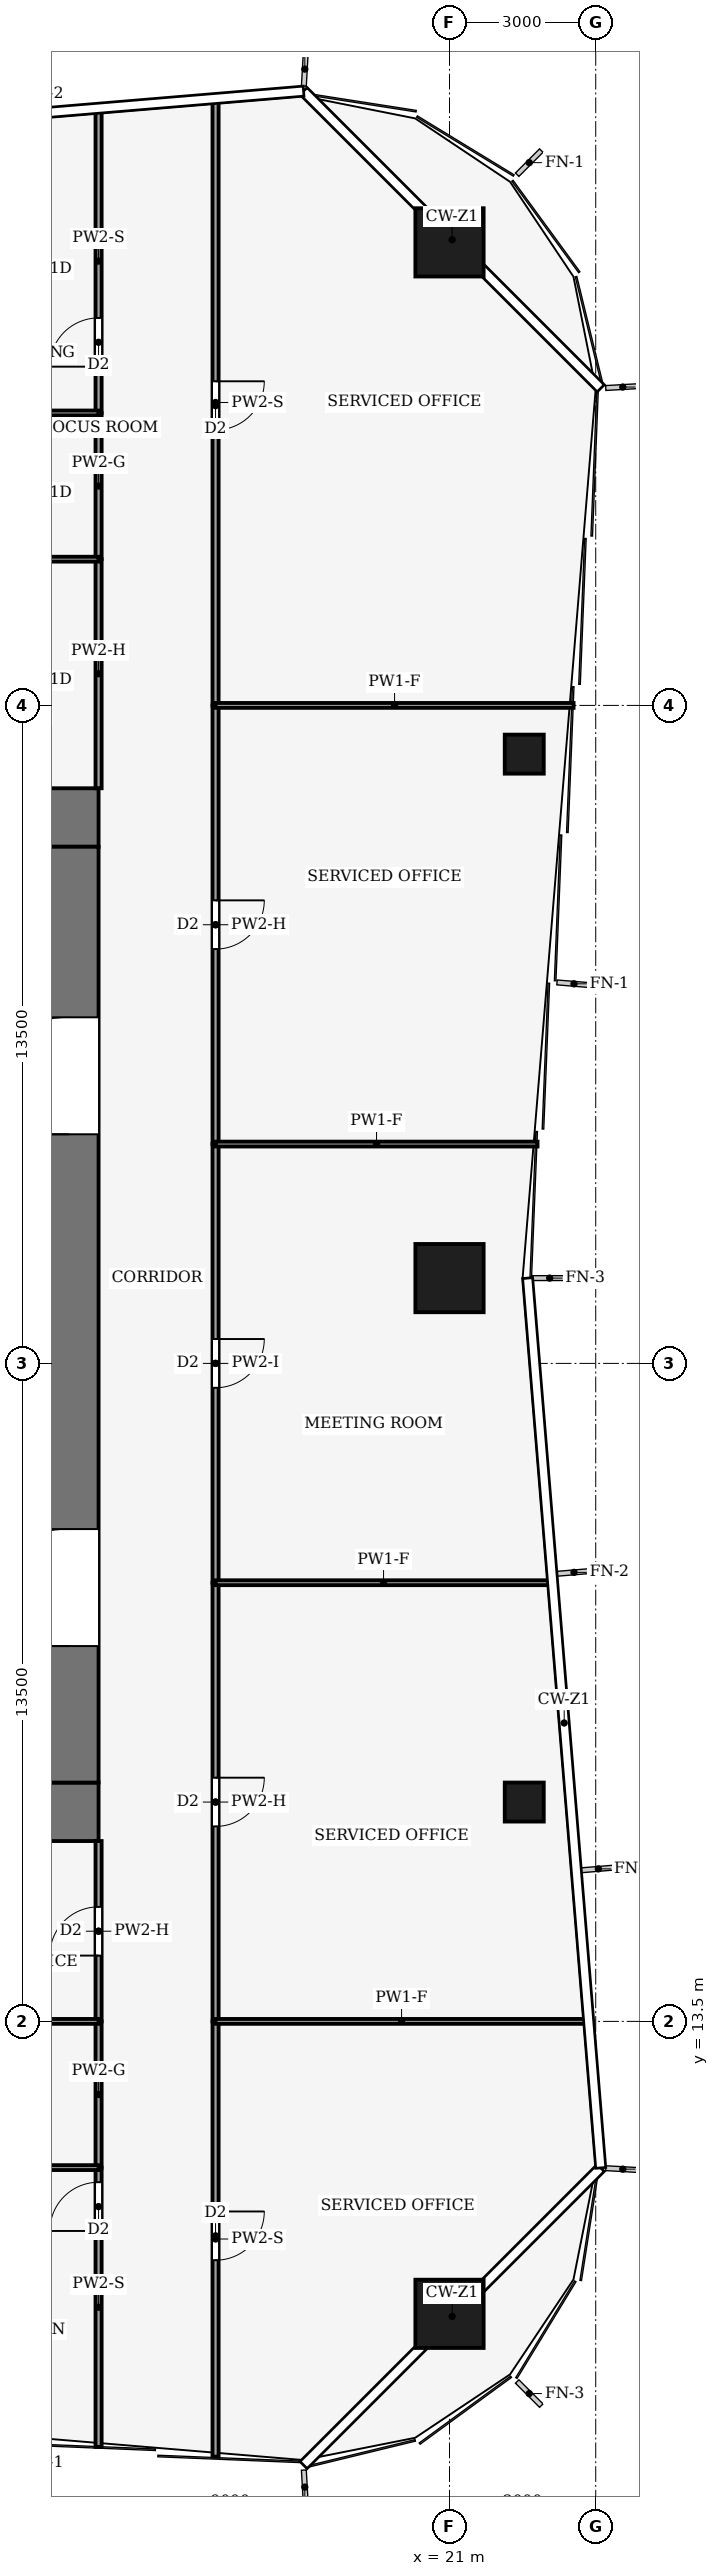
"""IFC4 building model, lengths in metres.
Left out: names, types, materials, properties, quantities, classifications, styles, units other than length and angle.
Written with IfcOpenShell. Run it as: python <this file> out.ifc"""

import sys

from ifc_helpers import new_model, si_unit, direction, frame, frame_2d, origin, origin_2d, place, context, subcontext, project, spatial, rectangle, hollow_rectangle, extrude, element, fill, save


model = new_model("IFC4")
c1 = context("Model", 3, precision=1e-05, world=origin(), true_north=direction((0.0, 1.0)))
c2 = subcontext(c1, "Body", "Model", "MODEL_VIEW")
j1 = project(units=[si_unit("LENGTHUNIT", "METRE"), si_unit("PLANEANGLEUNIT", "RADIAN")], contexts=[c1])
p1 = place(None, origin())
s1 = spatial("IfcSite", under=j1, at=p1, CompositionType="ELEMENT")
p2 = place(p1, origin())
s2 = spatial("IfcBuilding", under=s1, at=p2, CompositionType="ELEMENT")
p3 = place(p2, frame((0.0, 0.0, 94.0)))
s3 = spatial("IfcBuildingStorey", under=s2, at=p3, CompositionType="ELEMENT", Elevation=94.0)
for number, where, z_axis, x_axis in (
    (1, (-13.8, 17.8, -0.13), (0.0, 0.0, 1.0), (1.0, 0.0, 0.0)),
    (2, (-13.8, 38.2, -0.13), (0.0, 0.0, 1.0), (1.0, 0.0, 0.0)),
):
    element("IfcWall", number, at=place(p3, frame(where, z_axis=z_axis, x_axis=x_axis)), inside=s3, PredefinedType="SHEAR", context=c2, shape_type="SweptSolid", body=[
        extrude(rectangle(XDim=27.6, YDim=1.2, at=frame_2d((13.8, 0.0))), origin(), (0.0, 0.0, 1.0), 4.0),
    ])
p4 = place(p3, frame((13.2, 18.4, -0.13), z_axis=(0.0, 0.0, 1.0), x_axis=(0.0, 1.0, 0.0)))
e3 = element("IfcWall", 3, at=p4, inside=s3, PredefinedType="SHEAR", context=c2, shape_type="SweptSolid", body=[
    extrude(rectangle(XDim=19.2, YDim=1.2, at=frame_2d((9.6, 0.0))), origin(), (0.0, 0.0, 1.0), 4.0),
])
p5 = place(p4, frame((2.8, 0.0, 0.13)))
e4 = element("IfcOpeningElement", 4, at=p5, cuts=e3, PredefinedType="OPENING", context=c2, shape_type="SweptSolid", body=[
    extrude(rectangle(XDim=2.4, YDim=2.4, at=frame_2d((1.2, 1.2))), frame((0.0, 0.61, 0.0), z_axis=(0.0, -1.0, 0.0), x_axis=(1.0, 0.0, 0.0)), (0.0, 0.0, 1.0), 1.22),
])
p6 = place(p4, frame((13.3, 0.0, 0.13)))
e5 = element("IfcOpeningElement", 5, at=p6, cuts=e3, PredefinedType="OPENING", context=c2, shape_type="SweptSolid", body=[
    extrude(rectangle(XDim=2.4, YDim=2.4, at=frame_2d((1.2, 1.2))), frame((0.0, 0.61, 0.0), z_axis=(0.0, -1.0, 0.0), x_axis=(1.0, 0.0, 0.0)), (0.0, 0.0, 1.0), 1.22),
])
for number, where, z_axis, x_axis in (
    (6, (21.0, 50.0, 0.0), (0.0, 0.0, 1.0), (1.0, 0.0, 0.0)),
    (7, (21.0, 28.75, 0.0), (0.0, 0.0, 1.0), (1.0, 0.0, 0.0)),
    (8, (21.0, 7.5, 0.0), (0.0, 0.0, 1.0), (1.0, 0.0, 0.0)),
):
    element("IfcColumn", number, at=place(p3, frame(where, z_axis=z_axis, x_axis=x_axis)), inside=s3, PredefinedType="COLUMN", context=c2, shape_type="SweptSolid", body=[
        extrude(hollow_rectangle(XDim=1.4, YDim=1.4, WallThickness=0.08, at=origin_2d()), origin(), (0.0, 0.0, 1.0), 4.0),
    ])
for number, where, z_axis, x_axis in (
    (9, (22.534, 18.0, 0.0), (0.0, 0.0, 1.0), (1.0, 0.0, 0.0)),
    (10, (22.534, 39.5, 0.0), (0.0, 0.0, 1.0), (1.0, 0.0, 0.0)),
):
    element("IfcColumn", number, at=place(p3, frame(where, z_axis=z_axis, x_axis=x_axis)), inside=s3, PredefinedType="COLUMN", context=c2, shape_type="SweptSolid", body=[
        extrude(hollow_rectangle(XDim=0.8, YDim=0.8, WallThickness=0.04, at=origin_2d()), origin(), (0.0, 0.0, 1.0), 4.0),
    ])
p7 = place(p3, frame((16.2, 13.5, 0.0), z_axis=(0.0, 0.0, 1.0), x_axis=(0.0, -1.0, 0.0)))
e11 = element("IfcWall", 11, at=p7, inside=s3, PredefinedType="PARTITIONING", context=c2, shape_type="SweptSolid", body=[
    extrude(rectangle(XDim=8.93, YDim=0.125, at=frame_2d((4.465, 0.0))), origin(), (0.0, 0.0, 1.0), 3.04),
])
p8 = place(p7, frame((3.9, 0.0, 0.0)))
e12 = element("IfcOpeningElement", 12, at=p8, cuts=e11, PredefinedType="OPENING", context=c2, shape_type="SweptSolid", body=[
    extrude(rectangle(XDim=1.0, YDim=2.1, at=frame_2d((0.5, 1.05))), frame((0.0, 0.073, 0.0), z_axis=(0.0, -1.0, 0.0), x_axis=(1.0, 0.0, 0.0)), (0.0, 0.0, 1.0), 0.145),
])
p9 = place(p3, frame((16.2, 22.5, 0.0), z_axis=(0.0, 0.0, 1.0), x_axis=(0.0, -1.0, 0.0)))
e13 = element("IfcWall", 13, at=p9, inside=s3, PredefinedType="PARTITIONING", context=c2, shape_type="SweptSolid", body=[
    extrude(rectangle(XDim=9.0, YDim=0.125, at=frame_2d((4.5, 0.0))), origin(), (0.0, 0.0, 1.0), 3.14),
])
p10 = place(p9, frame((4.0, 0.0, 0.0)))
e14 = element("IfcOpeningElement", 14, at=p10, cuts=e13, PredefinedType="OPENING", context=c2, shape_type="SweptSolid", body=[
    extrude(rectangle(XDim=1.0, YDim=2.1, at=frame_2d((0.5, 1.05))), frame((0.0, 0.073, 0.0), z_axis=(0.0, -1.0, 0.0), x_axis=(1.0, 0.0, 0.0)), (0.0, 0.0, 1.0), 0.145),
])
p11 = place(p3, frame((16.2, 31.5, 0.0), z_axis=(0.0, 0.0, 1.0), x_axis=(0.0, -1.0, 0.0)))
e15 = element("IfcWall", 15, at=p11, inside=s3, PredefinedType="PARTITIONING", context=c2, shape_type="SweptSolid", body=[
    extrude(rectangle(XDim=9.0, YDim=0.125, at=frame_2d((4.5, 0.0))), origin(), (0.0, 0.0, 1.0), 3.48),
])
p12 = place(p11, frame((4.0, 0.0, 0.0)))
e16 = element("IfcOpeningElement", 16, at=p12, cuts=e15, PredefinedType="OPENING", context=c2, shape_type="SweptSolid", body=[
    extrude(rectangle(XDim=1.0, YDim=2.1, at=frame_2d((0.5, 1.05))), frame((0.0, 0.073, 0.0), z_axis=(0.0, -1.0, 0.0), x_axis=(1.0, 0.0, 0.0)), (0.0, 0.0, 1.0), 0.145),
])
p13 = place(p3, frame((16.2, 40.5, 0.0), z_axis=(0.0, 0.0, 1.0), x_axis=(0.0, -1.0, 0.0)))
e17 = element("IfcWall", 17, at=p13, inside=s3, PredefinedType="PARTITIONING", context=c2, shape_type="SweptSolid", body=[
    extrude(rectangle(XDim=9.0, YDim=0.125, at=frame_2d((4.5, 0.0))), origin(), (0.0, 0.0, 1.0), 3.14),
])
p14 = place(p13, frame((4.0, 0.0, 0.0)))
e18 = element("IfcOpeningElement", 18, at=p14, cuts=e17, PredefinedType="OPENING", context=c2, shape_type="SweptSolid", body=[
    extrude(rectangle(XDim=1.0, YDim=2.1, at=frame_2d((0.5, 1.05))), frame((0.0, 0.073, 0.0), z_axis=(0.0, -1.0, 0.0), x_axis=(1.0, 0.0, 0.0)), (0.0, 0.0, 1.0), 0.145),
])
p15 = place(p3, frame((16.2, 52.93, 0.0), z_axis=(0.0, 0.0, 1.0), x_axis=(0.0, -1.0, 0.0)))
e19 = element("IfcWall", 19, at=p15, inside=s3, PredefinedType="PARTITIONING", context=c2, shape_type="SweptSolid", body=[
    extrude(rectangle(XDim=12.43, YDim=0.125, at=frame_2d((6.215, 0.0))), origin(), (0.0, 0.0, 1.0), 3.04),
])
p16 = place(p15, frame((5.78, 0.0, 0.0)))
e20 = element("IfcOpeningElement", 20, at=p16, cuts=e19, PredefinedType="OPENING", context=c2, shape_type="SweptSolid", body=[
    extrude(rectangle(XDim=1.0, YDim=2.1, at=frame_2d((0.5, 1.05))), frame((0.0, 0.073, 0.0), z_axis=(0.0, -1.0, 0.0), x_axis=(1.0, 0.0, 0.0)), (0.0, 0.0, 1.0), 0.145),
])
p17 = place(p3, frame((13.8, 4.77, 0.0), z_axis=(0.0, 0.0, 1.0), x_axis=(0.0, 1.0, 0.0)))
e21 = element("IfcWall", 21, at=p17, inside=s3, PredefinedType="PARTITIONING", context=c2, shape_type="SweptSolid", body=[
    extrude(rectangle(XDim=5.73, YDim=0.125, at=frame_2d((2.865, 0.0))), origin(), (0.0, 0.0, 1.0), 3.04),
])
p18 = place(p17, frame((4.43, 0.0, 0.0)))
e22 = element("IfcOpeningElement", 22, at=p18, cuts=e21, PredefinedType="OPENING", context=c2, shape_type="SweptSolid", body=[
    extrude(rectangle(XDim=1.0, YDim=2.1, at=frame_2d((0.5, 1.05))), frame((0.0, 0.073, 0.0), z_axis=(0.0, -1.0, 0.0), x_axis=(1.0, 0.0, 0.0)), (0.0, 0.0, 1.0), 0.145),
])
p19 = place(p3, frame((13.8, 13.5, 0.0), z_axis=(0.0, 0.0, 1.0), x_axis=(0.0, -1.0, 0.0)))
e23 = element("IfcWall", 23, at=p19, inside=s3, PredefinedType="PARTITIONING", context=c2, shape_type="SweptSolid", body=[
    extrude(rectangle(XDim=3.0, YDim=0.125, at=frame_2d((1.5, 0.0))), origin(), (0.0, 0.0, 1.0), 3.87),
])
p20 = place(p3, frame((13.8, 13.5, 0.0), z_axis=(0.0, 0.0, 1.0), x_axis=(0.0, 1.0, 0.0)))
e24 = element("IfcWall", 24, at=p20, inside=s3, PredefinedType="PARTITIONING", context=c2, shape_type="SweptSolid", body=[
    extrude(rectangle(XDim=3.7, YDim=0.125, at=frame_2d((1.85, 0.0))), origin(), (0.0, 0.0, 1.0), 3.14),
])
p21 = place(p20, frame((1.35, 0.0, 0.0)))
e25 = element("IfcOpeningElement", 25, at=p21, cuts=e24, PredefinedType="OPENING", context=c2, shape_type="SweptSolid", body=[
    extrude(rectangle(XDim=1.0, YDim=2.1, at=frame_2d((0.5, 1.05))), frame((0.0, 0.073, 0.0), z_axis=(0.0, -1.0, 0.0), x_axis=(1.0, 0.0, 0.0)), (0.0, 0.0, 1.0), 0.145),
])
p22 = place(p3, frame((13.8, 43.5, 0.0), z_axis=(0.0, 0.0, 1.0), x_axis=(0.0, -1.0, 0.0)))
e26 = element("IfcWall", 26, at=p22, inside=s3, PredefinedType="PARTITIONING", context=c2, shape_type="SweptSolid", body=[
    extrude(rectangle(XDim=4.7, YDim=0.125, at=frame_2d((2.35, 0.0))), origin(), (0.0, 0.0, 1.0), 3.14),
])
p23 = place(p3, frame((13.8, 46.5, 0.0), z_axis=(0.0, 0.0, 1.0), x_axis=(0.0, -1.0, 0.0)))
e27 = element("IfcWall", 27, at=p23, inside=s3, PredefinedType="PARTITIONING", context=c2, shape_type="SweptSolid", body=[
    extrude(rectangle(XDim=3.0, YDim=0.125, at=frame_2d((1.5, 0.0))), origin(), (0.0, 0.0, 1.0), 3.87),
])
p24 = place(p3, frame((13.8, 46.5, 0.0), z_axis=(0.0, 0.0, 1.0), x_axis=(0.0, 1.0, 0.0)))
e28 = element("IfcWall", 28, at=p24, inside=s3, PredefinedType="PARTITIONING", context=c2, shape_type="SweptSolid", body=[
    extrude(rectangle(XDim=6.23, YDim=0.125, at=frame_2d((3.115, 0.0))), origin(), (0.0, 0.0, 1.0), 3.04),
])
p25 = place(p24, frame((0.95, 0.0, 0.0)))
e29 = element("IfcOpeningElement", 29, at=p25, cuts=e28, PredefinedType="OPENING", context=c2, shape_type="SweptSolid", body=[
    extrude(rectangle(XDim=1.0, YDim=2.1, at=frame_2d((0.5, 1.05))), frame((0.0, 0.073, 0.0), z_axis=(0.0, -1.0, 0.0), x_axis=(1.0, 0.0, 0.0)), (0.0, 0.0, 1.0), 0.145),
])
p26 = place(p3, frame((23.833, 13.5, 0.0), z_axis=(0.0, 0.0, 1.0), x_axis=(-1.0, 0.0, 0.0)))
e30 = element("IfcWall", 30, at=p26, inside=s3, PredefinedType="PARTITIONING", context=c2, shape_type="SweptSolid", body=[
    extrude(rectangle(XDim=7.634, YDim=0.1, at=frame_2d((3.817, 0.0))), origin(), (0.0, 0.0, 1.0), 3.04),
])
p27 = place(p3, frame((23.094, 22.5, 0.0), z_axis=(0.0, 0.0, 1.0), x_axis=(-1.0, 0.0, 0.0)))
e31 = element("IfcWall", 31, at=p27, inside=s3, PredefinedType="PARTITIONING", context=c2, shape_type="SweptSolid", body=[
    extrude(rectangle(XDim=6.894, YDim=0.1, at=frame_2d((3.447, 0.0))), origin(), (0.0, 0.0, 1.0), 3.04),
])
p28 = place(p3, frame((22.806, 31.5, 0.0), z_axis=(0.0, 0.0, 1.0), x_axis=(-1.0, 0.0, 0.0)))
e32 = element("IfcWall", 32, at=p28, inside=s3, PredefinedType="PARTITIONING", context=c2, shape_type="SweptSolid", body=[
    extrude(rectangle(XDim=6.606, YDim=0.1, at=frame_2d((3.303, 0.0))), origin(), (0.0, 0.0, 1.0), 3.04),
])
p29 = place(p3, frame((23.546, 40.5, 0.0), z_axis=(0.0, 0.0, 1.0), x_axis=(-1.0, 0.0, 0.0)))
e33 = element("IfcWall", 33, at=p29, inside=s3, PredefinedType="PARTITIONING", context=c2, shape_type="SweptSolid", body=[
    extrude(rectangle(XDim=7.346, YDim=0.1, at=frame_2d((3.673, 0.0))), origin(), (0.0, 0.0, 1.0), 3.04),
])
p30 = place(p3, frame((7.5, 10.5, 0.0), z_axis=(0.0, 0.0, 1.0), x_axis=(1.0, 0.0, 0.0)))
e34 = element("IfcWall", 34, at=p30, inside=s3, PredefinedType="PARTITIONING", context=c2, shape_type="SweptSolid", body=[
    extrude(rectangle(XDim=6.3, YDim=0.1, at=frame_2d((3.15, 0.0))), origin(), (0.0, 0.0, 1.0), 3.39),
])
p31 = place(p30, frame((2.65, 0.0, 0.0)))
e35 = element("IfcOpeningElement", 35, at=p31, cuts=e34, PredefinedType="OPENING", context=c2, shape_type="SweptSolid", body=[
    extrude(rectangle(XDim=1.0, YDim=2.1, at=frame_2d((0.5, 1.05))), frame((0.0, 0.06, 0.0), z_axis=(0.0, -1.0, 0.0), x_axis=(1.0, 0.0, 0.0)), (0.0, 0.0, 1.0), 0.12),
])
p32 = place(p3, frame((13.8, 13.5, 0.0), z_axis=(0.0, 0.0, 1.0), x_axis=(-1.0, 0.0, 0.0)))
e36 = element("IfcWall", 36, at=p32, inside=s3, PredefinedType="PARTITIONING", context=c2, shape_type="SweptSolid", body=[
    extrude(rectangle(XDim=6.3, YDim=0.1, at=frame_2d((3.15, 0.0))), origin(), (0.0, 0.0, 1.0), 3.39),
])
p33 = place(p3, frame((13.8, 43.5, 0.0), z_axis=(0.0, 0.0, 1.0), x_axis=(-1.0, 0.0, 0.0)))
e37 = element("IfcWall", 37, at=p33, inside=s3, PredefinedType="PARTITIONING", context=c2, shape_type="SweptSolid", body=[
    extrude(rectangle(XDim=3.3, YDim=0.1, at=frame_2d((1.65, 0.0))), origin(), (0.0, 0.0, 1.0), 3.39),
])
p34 = place(p33, frame((1.15, 0.0, 0.0)))
e38 = element("IfcOpeningElement", 38, at=p34, cuts=e37, PredefinedType="OPENING", context=c2, shape_type="SweptSolid", body=[
    extrude(rectangle(XDim=1.0, YDim=2.1, at=frame_2d((0.5, 1.05))), frame((0.0, 0.06, 0.0), z_axis=(0.0, -1.0, 0.0), x_axis=(1.0, 0.0, 0.0)), (0.0, 0.0, 1.0), 0.12),
])
p35 = place(p3, frame((13.8, 46.5, 0.0), z_axis=(0.0, 0.0, 1.0), x_axis=(-1.0, 0.0, 0.0)))
e39 = element("IfcWall", 39, at=p35, inside=s3, PredefinedType="PARTITIONING", context=c2, shape_type="SweptSolid", body=[
    extrude(rectangle(XDim=3.3, YDim=0.1, at=frame_2d((1.65, 0.0))), origin(), (0.0, 0.0, 1.0), 3.39),
])
p36 = place(p35, frame((1.95, 0.0, 0.0)))
e40 = element("IfcOpeningElement", 40, at=p36, cuts=e39, PredefinedType="OPENING", context=c2, shape_type="SweptSolid", body=[
    extrude(rectangle(XDim=1.0, YDim=2.1, at=frame_2d((0.5, 1.05))), frame((0.0, 0.06, 0.0), z_axis=(0.0, -1.0, 0.0), x_axis=(1.0, 0.0, 0.0)), (0.0, 0.0, 1.0), 0.12),
])
p37 = place(p5, origin())
e41 = element("IfcDoor", 41, at=p37, inside=s3, OperationType="DOUBLE_DOOR_SINGLE_SWING", PredefinedType="DOOR", context=c2, shape_type="SweptSolid", body=[
    extrude(rectangle(XDim=2.4, YDim=2.4, at=frame_2d((1.2, 1.2))), frame((0.0, 0.025, 0.0), z_axis=(0.0, -1.0, 0.0), x_axis=(1.0, 0.0, 0.0)), (0.0, 0.0, 1.0), 0.05),
])
fill(e4, e41)
p38 = place(p6, origin())
e42 = element("IfcDoor", 42, at=p38, inside=s3, OperationType="DOUBLE_DOOR_SINGLE_SWING", PredefinedType="DOOR", context=c2, shape_type="SweptSolid", body=[
    extrude(rectangle(XDim=2.4, YDim=2.4, at=frame_2d((1.2, 1.2))), frame((0.0, 0.025, 0.0), z_axis=(0.0, -1.0, 0.0), x_axis=(1.0, 0.0, 0.0)), (0.0, 0.0, 1.0), 0.05),
])
fill(e5, e42)
p39 = place(p8, origin())
e43 = element("IfcDoor", 43, at=p39, inside=s3, OperationType="SINGLE_SWING_LEFT", PredefinedType="DOOR", context=c2, shape_type="SweptSolid", body=[
    extrude(rectangle(XDim=1.0, YDim=2.1, at=frame_2d((0.5, 1.05))), frame((0.0, 0.025, 0.0), z_axis=(0.0, -1.0, 0.0), x_axis=(1.0, 0.0, 0.0)), (0.0, 0.0, 1.0), 0.05),
])
fill(e12, e43)
p40 = place(p10, origin())
e44 = element("IfcDoor", 44, at=p40, inside=s3, OperationType="SINGLE_SWING_RIGHT", PredefinedType="DOOR", context=c2, shape_type="SweptSolid", body=[
    extrude(rectangle(XDim=1.0, YDim=2.1, at=frame_2d((0.5, 1.05))), frame((0.0, 0.025, 0.0), z_axis=(0.0, -1.0, 0.0), x_axis=(1.0, 0.0, 0.0)), (0.0, 0.0, 1.0), 0.05),
])
fill(e14, e44)
p41 = place(p12, origin())
e45 = element("IfcDoor", 45, at=p41, inside=s3, OperationType="SINGLE_SWING_LEFT", PredefinedType="DOOR", context=c2, shape_type="SweptSolid", body=[
    extrude(rectangle(XDim=1.0, YDim=2.1, at=frame_2d((0.5, 1.05))), frame((0.0, 0.025, 0.0), z_axis=(0.0, -1.0, 0.0), x_axis=(1.0, 0.0, 0.0)), (0.0, 0.0, 1.0), 0.05),
])
fill(e16, e45)
p42 = place(p14, origin())
e46 = element("IfcDoor", 46, at=p42, inside=s3, OperationType="SINGLE_SWING_RIGHT", PredefinedType="DOOR", context=c2, shape_type="SweptSolid", body=[
    extrude(rectangle(XDim=1.0, YDim=2.1, at=frame_2d((0.5, 1.05))), frame((0.0, 0.025, 0.0), z_axis=(0.0, -1.0, 0.0), x_axis=(1.0, 0.0, 0.0)), (0.0, 0.0, 1.0), 0.05),
])
fill(e18, e46)
p43 = place(p16, origin())
e47 = element("IfcDoor", 47, at=p43, inside=s3, OperationType="SINGLE_SWING_RIGHT", PredefinedType="DOOR", context=c2, shape_type="SweptSolid", body=[
    extrude(rectangle(XDim=1.0, YDim=2.1, at=frame_2d((0.5, 1.05))), frame((0.0, 0.025, 0.0), z_axis=(0.0, -1.0, 0.0), x_axis=(1.0, 0.0, 0.0)), (0.0, 0.0, 1.0), 0.05),
])
fill(e20, e47)
p44 = place(p18, origin())
e48 = element("IfcDoor", 48, at=p44, inside=s3, OperationType="SINGLE_SWING_RIGHT", PredefinedType="DOOR", context=c2, shape_type="SweptSolid", body=[
    extrude(rectangle(XDim=1.0, YDim=2.1, at=frame_2d((0.5, 1.05))), frame((0.0, 0.025, 0.0), z_axis=(0.0, -1.0, 0.0), x_axis=(1.0, 0.0, 0.0)), (0.0, 0.0, 1.0), 0.05),
])
fill(e22, e48)
p45 = place(p21, origin())
e49 = element("IfcDoor", 49, at=p45, inside=s3, OperationType="SINGLE_SWING_LEFT", PredefinedType="DOOR", context=c2, shape_type="SweptSolid", body=[
    extrude(rectangle(XDim=1.0, YDim=2.1, at=frame_2d((0.5, 1.05))), frame((0.0, 0.025, 0.0), z_axis=(0.0, -1.0, 0.0), x_axis=(1.0, 0.0, 0.0)), (0.0, 0.0, 1.0), 0.05),
])
fill(e25, e49)
p46 = place(p25, origin())
e50 = element("IfcDoor", 50, at=p46, inside=s3, OperationType="SINGLE_SWING_LEFT", PredefinedType="DOOR", context=c2, shape_type="SweptSolid", body=[
    extrude(rectangle(XDim=1.0, YDim=2.1, at=frame_2d((0.5, 1.05))), frame((0.0, 0.025, 0.0), z_axis=(0.0, -1.0, 0.0), x_axis=(1.0, 0.0, 0.0)), (0.0, 0.0, 1.0), 0.05),
])
fill(e29, e50)
save(model, sys.argv[1])
